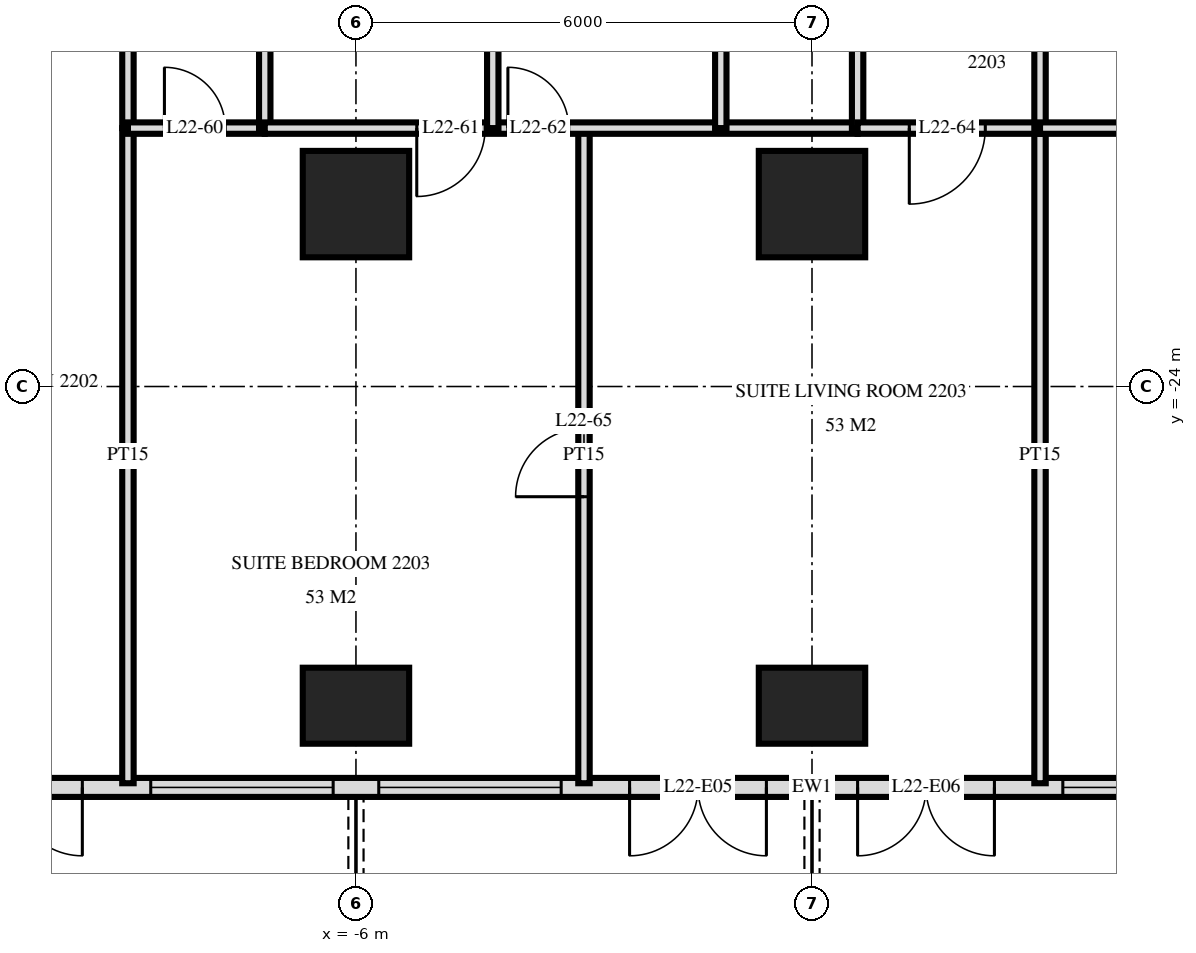
"""IFC4 building model, lengths in metres.
Left out: names, types, materials, properties, quantities, classifications, styles, units other than length and angle.
Written with IfcOpenShell. Run it as: python <this file> out.ifc"""

import sys

from ifc_helpers import new_model, si_unit, direction, frame, frame_2d, origin, origin_2d, place, context, subcontext, project, spatial, rectangle, extrude, element, fill, save


model = new_model("IFC4")
c1 = context("Model", 3, precision=1e-05, world=origin(), true_north=direction((0.0, 1.0)))
c2 = subcontext(c1, "Body", "Model", "MODEL_VIEW")
j1 = project(units=[si_unit("LENGTHUNIT", "METRE"), si_unit("PLANEANGLEUNIT", "RADIAN")], contexts=[c1])
p1 = place(None, origin())
s1 = spatial("IfcSite", under=j1, at=p1, CompositionType="ELEMENT")
p2 = place(p1, origin())
s2 = spatial("IfcBuilding", under=s1, at=p2, CompositionType="ELEMENT")
p3 = place(p2, frame((0.0, 0.0, 88.8)))
s3 = spatial("IfcBuildingStorey", under=s2, at=p3, CompositionType="ELEMENT", Elevation=88.8)
p4 = place(p3, frame((-6.0, -28.2, 0.0), z_axis=(0.0, 0.0, 1.0), x_axis=(1.0, 0.0, 0.0)))
e1 = element("IfcColumn", 1, at=p4, inside=s3, PredefinedType="COLUMN", context=c2, shape_type="SweptSolid", body=[
    extrude(rectangle(XDim=1.4, YDim=1.0, at=origin_2d()), origin(), (0.0, 0.0, 1.0), 3.6),
])
p5 = place(p3, frame((-6.0, -21.6, 0.0), z_axis=(0.0, 0.0, 1.0), x_axis=(1.0, 0.0, 0.0)))
e2 = element("IfcColumn", 2, at=p5, inside=s3, PredefinedType="COLUMN", context=c2, shape_type="SweptSolid", body=[
    extrude(rectangle(XDim=1.4, YDim=1.4, at=origin_2d()), origin(), (0.0, 0.0, 1.0), 3.6),
])
p6 = place(p3, frame((0.0, -28.2, 0.0), z_axis=(0.0, 0.0, 1.0), x_axis=(1.0, 0.0, 0.0)))
e3 = element("IfcColumn", 3, at=p6, inside=s3, PredefinedType="COLUMN", context=c2, shape_type="SweptSolid", body=[
    extrude(rectangle(XDim=1.4, YDim=1.0, at=origin_2d()), origin(), (0.0, 0.0, 1.0), 3.6),
])
p7 = place(p3, frame((0.0, -21.6, 0.0), z_axis=(0.0, 0.0, 1.0), x_axis=(1.0, 0.0, 0.0)))
e4 = element("IfcColumn", 4, at=p7, inside=s3, PredefinedType="COLUMN", context=c2, shape_type="SweptSolid", body=[
    extrude(rectangle(XDim=1.4, YDim=1.4, at=origin_2d()), origin(), (0.0, 0.0, 1.0), 3.6),
])
p8 = place(p3, frame((-28.775, -29.275, 0.0), z_axis=(0.0, 0.0, 1.0), x_axis=(1.0, 0.0, 0.0)))
e5 = element("IfcWall", 5, at=p8, inside=s3, PredefinedType="SOLIDWALL", context=c2, shape_type="SweptSolid", body=[
    extrude(rectangle(XDim=57.551, YDim=0.25, at=frame_2d((28.775, 0.0))), origin(), (0.0, 0.0, 1.0), 3.32),
])
p9 = place(p8, frame((0.575, 0.0, 0.0)))
e6 = element("IfcOpeningElement", 6, at=p9, cuts=e5, PredefinedType="OPENING", context=c2, shape_type="SweptSolid", body=[
    extrude(rectangle(XDim=1.8, YDim=2.4, at=frame_2d((0.9, 1.2))), frame((0.0, 0.135, 0.0), z_axis=(0.0, -1.0, 0.0), x_axis=(1.0, 0.0, 0.0)), (0.0, 0.0, 1.0), 0.27),
])
p10 = place(p8, frame((5.075, 0.0, 0.3)))
e7 = element("IfcOpeningElement", 7, at=p10, cuts=e5, PredefinedType="OPENING", context=c2, shape_type="SweptSolid", body=[
    extrude(rectangle(XDim=2.4, YDim=2.1, at=frame_2d((1.2, 1.05))), frame((0.0, 0.135, 0.0), z_axis=(0.0, -1.0, 0.0), x_axis=(1.0, 0.0, 0.0)), (0.0, 0.0, 1.0), 0.27),
])
p11 = place(p8, frame((8.375, 0.0, 0.0)))
e8 = element("IfcOpeningElement", 8, at=p11, cuts=e5, PredefinedType="OPENING", context=c2, shape_type="SweptSolid", body=[
    extrude(rectangle(XDim=1.8, YDim=2.4, at=frame_2d((0.9, 1.2))), frame((0.0, 0.135, 0.0), z_axis=(0.0, -1.0, 0.0), x_axis=(1.0, 0.0, 0.0)), (0.0, 0.0, 1.0), 0.27),
])
p12 = place(p8, frame((11.375, 0.0, 0.0)))
e9 = element("IfcOpeningElement", 9, at=p12, cuts=e5, PredefinedType="OPENING", context=c2, shape_type="SweptSolid", body=[
    extrude(rectangle(XDim=1.8, YDim=2.4, at=frame_2d((0.9, 1.2))), frame((0.0, 0.135, 0.0), z_axis=(0.0, -1.0, 0.0), x_axis=(1.0, 0.0, 0.0)), (0.0, 0.0, 1.0), 0.27),
])
p13 = place(p8, frame((14.075, 0.0, 0.3)))
e10 = element("IfcOpeningElement", 10, at=p13, cuts=e5, PredefinedType="OPENING", context=c2, shape_type="SweptSolid", body=[
    extrude(rectangle(XDim=2.4, YDim=2.1, at=frame_2d((1.2, 1.05))), frame((0.0, 0.135, 0.0), z_axis=(0.0, -1.0, 0.0), x_axis=(1.0, 0.0, 0.0)), (0.0, 0.0, 1.0), 0.27),
])
p14 = place(p8, frame((17.375, 0.0, 0.0)))
e11 = element("IfcOpeningElement", 11, at=p14, cuts=e5, PredefinedType="OPENING", context=c2, shape_type="SweptSolid", body=[
    extrude(rectangle(XDim=1.8, YDim=2.4, at=frame_2d((0.9, 1.2))), frame((0.0, 0.135, 0.0), z_axis=(0.0, -1.0, 0.0), x_axis=(1.0, 0.0, 0.0)), (0.0, 0.0, 1.0), 0.27),
])
p15 = place(p8, frame((20.075, 0.0, 0.3)))
e12 = element("IfcOpeningElement", 12, at=p15, cuts=e5, PredefinedType="OPENING", context=c2, shape_type="SweptSolid", body=[
    extrude(rectangle(XDim=2.4, YDim=2.1, at=frame_2d((1.2, 1.05))), frame((0.0, 0.135, 0.0), z_axis=(0.0, -1.0, 0.0), x_axis=(1.0, 0.0, 0.0)), (0.0, 0.0, 1.0), 0.27),
])
p16 = place(p8, frame((23.075, 0.0, 0.3)))
e13 = element("IfcOpeningElement", 13, at=p16, cuts=e5, PredefinedType="OPENING", context=c2, shape_type="SweptSolid", body=[
    extrude(rectangle(XDim=2.4, YDim=2.1, at=frame_2d((1.2, 1.05))), frame((0.0, 0.135, 0.0), z_axis=(0.0, -1.0, 0.0), x_axis=(1.0, 0.0, 0.0)), (0.0, 0.0, 1.0), 0.27),
])
p17 = place(p8, frame((26.375, 0.0, 0.0)))
e14 = element("IfcOpeningElement", 14, at=p17, cuts=e5, PredefinedType="OPENING", context=c2, shape_type="SweptSolid", body=[
    extrude(rectangle(XDim=1.8, YDim=2.4, at=frame_2d((0.9, 1.2))), frame((0.0, 0.135, 0.0), z_axis=(0.0, -1.0, 0.0), x_axis=(1.0, 0.0, 0.0)), (0.0, 0.0, 1.0), 0.27),
])
p18 = place(p8, frame((29.375, 0.0, 0.0)))
e15 = element("IfcOpeningElement", 15, at=p18, cuts=e5, PredefinedType="OPENING", context=c2, shape_type="SweptSolid", body=[
    extrude(rectangle(XDim=1.8, YDim=2.4, at=frame_2d((0.9, 1.2))), frame((0.0, 0.135, 0.0), z_axis=(0.0, -1.0, 0.0), x_axis=(1.0, 0.0, 0.0)), (0.0, 0.0, 1.0), 0.27),
])
p19 = place(p8, frame((32.075, 0.0, 0.3)))
e16 = element("IfcOpeningElement", 16, at=p19, cuts=e5, PredefinedType="OPENING", context=c2, shape_type="SweptSolid", body=[
    extrude(rectangle(XDim=2.4, YDim=2.1, at=frame_2d((1.2, 1.05))), frame((0.0, 0.135, 0.0), z_axis=(0.0, -1.0, 0.0), x_axis=(1.0, 0.0, 0.0)), (0.0, 0.0, 1.0), 0.27),
])
p20 = place(p8, frame((35.375, 0.0, 0.0)))
e17 = element("IfcOpeningElement", 17, at=p20, cuts=e5, PredefinedType="OPENING", context=c2, shape_type="SweptSolid", body=[
    extrude(rectangle(XDim=1.8, YDim=2.4, at=frame_2d((0.9, 1.2))), frame((0.0, 0.135, 0.0), z_axis=(0.0, -1.0, 0.0), x_axis=(1.0, 0.0, 0.0)), (0.0, 0.0, 1.0), 0.27),
])
p21 = place(p8, frame((38.075, 0.0, 0.3)))
e18 = element("IfcOpeningElement", 18, at=p21, cuts=e5, PredefinedType="OPENING", context=c2, shape_type="SweptSolid", body=[
    extrude(rectangle(XDim=2.4, YDim=2.1, at=frame_2d((1.2, 1.05))), frame((0.0, 0.135, 0.0), z_axis=(0.0, -1.0, 0.0), x_axis=(1.0, 0.0, 0.0)), (0.0, 0.0, 1.0), 0.27),
])
p22 = place(p8, frame((41.075, 0.0, 0.3)))
e19 = element("IfcOpeningElement", 19, at=p22, cuts=e5, PredefinedType="OPENING", context=c2, shape_type="SweptSolid", body=[
    extrude(rectangle(XDim=2.4, YDim=2.1, at=frame_2d((1.2, 1.05))), frame((0.0, 0.135, 0.0), z_axis=(0.0, -1.0, 0.0), x_axis=(1.0, 0.0, 0.0)), (0.0, 0.0, 1.0), 0.27),
])
p23 = place(p8, frame((44.375, 0.0, 0.0)))
e20 = element("IfcOpeningElement", 20, at=p23, cuts=e5, PredefinedType="OPENING", context=c2, shape_type="SweptSolid", body=[
    extrude(rectangle(XDim=1.8, YDim=2.4, at=frame_2d((0.9, 1.2))), frame((0.0, 0.135, 0.0), z_axis=(0.0, -1.0, 0.0), x_axis=(1.0, 0.0, 0.0)), (0.0, 0.0, 1.0), 0.27),
])
p24 = place(p8, frame((47.075, 0.0, 0.3)))
e21 = element("IfcOpeningElement", 21, at=p24, cuts=e5, PredefinedType="OPENING", context=c2, shape_type="SweptSolid", body=[
    extrude(rectangle(XDim=2.4, YDim=2.1, at=frame_2d((1.2, 1.05))), frame((0.0, 0.135, 0.0), z_axis=(0.0, -1.0, 0.0), x_axis=(1.0, 0.0, 0.0)), (0.0, 0.0, 1.0), 0.27),
])
p25 = place(p8, frame((50.375, 0.0, 0.0)))
e22 = element("IfcOpeningElement", 22, at=p25, cuts=e5, PredefinedType="OPENING", context=c2, shape_type="SweptSolid", body=[
    extrude(rectangle(XDim=1.8, YDim=2.4, at=frame_2d((0.9, 1.2))), frame((0.0, 0.135, 0.0), z_axis=(0.0, -1.0, 0.0), x_axis=(1.0, 0.0, 0.0)), (0.0, 0.0, 1.0), 0.27),
])
p26 = place(p8, frame((53.375, 0.0, 0.0)))
e23 = element("IfcOpeningElement", 23, at=p26, cuts=e5, PredefinedType="OPENING", context=c2, shape_type="SweptSolid", body=[
    extrude(rectangle(XDim=1.8, YDim=2.4, at=frame_2d((0.9, 1.2))), frame((0.0, 0.135, 0.0), z_axis=(0.0, -1.0, 0.0), x_axis=(1.0, 0.0, 0.0)), (0.0, 0.0, 1.0), 0.27),
])
p27 = place(p3, frame((3.0, -20.6, 0.0), z_axis=(0.0, 0.0, 1.0), x_axis=(0.0, 1.0, 0.0)))
e24 = element("IfcWall", 24, at=p27, inside=s3, PredefinedType="PARTITIONING", context=c2, shape_type="SweptSolid", body=[
    extrude(rectangle(XDim=3.6, YDim=0.15, at=frame_2d((1.8, 0.0))), origin(), (0.0, 0.0, 1.0), 3.32),
])
p28 = place(p3, frame((3.0, -29.22, 0.0), z_axis=(0.0, 0.0, 1.0), x_axis=(0.0, 1.0, 0.0)))
e25 = element("IfcWall", 25, at=p28, inside=s3, PredefinedType="PARTITIONING", context=c2, shape_type="SweptSolid", body=[
    extrude(rectangle(XDim=8.62, YDim=0.15, at=frame_2d((4.31, 0.0))), origin(), (0.0, 0.0, 1.0), 3.32),
])
p29 = place(p3, frame((0.6, -20.6, 0.0), z_axis=(0.0, 0.0, 1.0), x_axis=(0.0, 1.0, 0.0)))
e26 = element("IfcWall", 26, at=p29, inside=s3, PredefinedType="PARTITIONING", context=c2, shape_type="SweptSolid", body=[
    extrude(rectangle(XDim=3.6, YDim=0.15, at=frame_2d((1.8, 0.0))), origin(), (0.0, 0.0, 1.0), 3.32),
])
p30 = place(p29, frame((1.28, 0.0, 0.0)))
e27 = element("IfcOpeningElement", 27, at=p30, cuts=e26, PredefinedType="OPENING", context=c2, shape_type="SweptSolid", body=[
    extrude(rectangle(XDim=1.0, YDim=2.1, at=frame_2d((0.5, 1.05))), frame((0.0, 0.085, 0.0), z_axis=(0.0, -1.0, 0.0), x_axis=(1.0, 0.0, 0.0)), (0.0, 0.0, 1.0), 0.17),
])
p31 = place(p3, frame((-1.2, -20.6, 0.0), z_axis=(0.0, 0.0, 1.0), x_axis=(0.0, 1.0, 0.0)))
e28 = element("IfcWall", 28, at=p31, inside=s3, PredefinedType="PARTITIONING", context=c2, shape_type="SweptSolid", body=[
    extrude(rectangle(XDim=3.6, YDim=0.15, at=frame_2d((1.8, 0.0))), origin(), (0.0, 0.0, 1.0), 3.32),
])
p32 = place(p3, frame((-3.0, -29.22, 0.0), z_axis=(0.0, 0.0, 1.0), x_axis=(0.0, 1.0, 0.0)))
e29 = element("IfcWall", 29, at=p32, inside=s3, PredefinedType="PARTITIONING", context=c2, shape_type="SweptSolid", body=[
    extrude(rectangle(XDim=8.62, YDim=0.15, at=frame_2d((4.31, 0.0))), origin(), (0.0, 0.0, 1.0), 3.32),
])
p33 = place(p32, frame((3.77, 0.0, 0.0)))
e30 = element("IfcOpeningElement", 30, at=p33, cuts=e29, PredefinedType="OPENING", context=c2, shape_type="SweptSolid", body=[
    extrude(rectangle(XDim=0.9, YDim=2.1, at=frame_2d((0.45, 1.05))), frame((0.0, 0.085, 0.0), z_axis=(0.0, -1.0, 0.0), x_axis=(1.0, 0.0, 0.0)), (0.0, 0.0, 1.0), 0.17),
])
p34 = place(p3, frame((-4.2, -20.6, 0.0), z_axis=(0.0, 0.0, 1.0), x_axis=(0.0, 1.0, 0.0)))
e31 = element("IfcWall", 31, at=p34, inside=s3, PredefinedType="PARTITIONING", context=c2, shape_type="SweptSolid", body=[
    extrude(rectangle(XDim=3.6, YDim=0.15, at=frame_2d((1.8, 0.0))), origin(), (0.0, 0.0, 1.0), 3.32),
])
p35 = place(p3, frame((-7.2, -20.6, 0.0), z_axis=(0.0, 0.0, 1.0), x_axis=(0.0, 1.0, 0.0)))
e32 = element("IfcWall", 32, at=p35, inside=s3, PredefinedType="PLUMBINGWALL", context=c2, shape_type="SweptSolid", body=[
    extrude(rectangle(XDim=3.6, YDim=0.15, at=frame_2d((1.8, 0.0))), origin(), (0.0, 0.0, 1.0), 3.32),
])
p36 = place(p3, frame((-9.0, -29.22, 0.0), z_axis=(0.0, 0.0, 1.0), x_axis=(0.0, 1.0, 0.0)))
e33 = element("IfcWall", 33, at=p36, inside=s3, PredefinedType="PARTITIONING", context=c2, shape_type="SweptSolid", body=[
    extrude(rectangle(XDim=8.62, YDim=0.15, at=frame_2d((4.31, 0.0))), origin(), (0.0, 0.0, 1.0), 3.32),
])
p37 = place(p3, frame((-9.0, -20.6, 0.0), z_axis=(0.0, 0.0, 1.0), x_axis=(0.0, 1.0, 0.0)))
e34 = element("IfcWall", 34, at=p37, inside=s3, PredefinedType="PLUMBINGWALL", context=c2, shape_type="SweptSolid", body=[
    extrude(rectangle(XDim=3.6, YDim=0.15, at=frame_2d((1.8, 0.0))), origin(), (0.0, 0.0, 1.0), 3.32),
])
p38 = place(p3, frame((0.6, -20.6, 0.0), z_axis=(0.0, 0.0, 1.0), x_axis=(1.0, 0.0, 0.0)))
e35 = element("IfcWall", 35, at=p38, inside=s3, PredefinedType="PARTITIONING", context=c2, shape_type="SweptSolid", body=[
    extrude(rectangle(XDim=2.4, YDim=0.15, at=frame_2d((1.2, 0.0))), origin(), (0.0, 0.0, 1.0), 3.32),
])
p39 = place(p38, frame((0.68, 0.0, 0.0)))
e36 = element("IfcOpeningElement", 36, at=p39, cuts=e35, PredefinedType="OPENING", context=c2, shape_type="SweptSolid", body=[
    extrude(rectangle(XDim=1.0, YDim=2.1, at=frame_2d((0.5, 1.05))), frame((0.0, 0.085, 0.0), z_axis=(0.0, -1.0, 0.0), x_axis=(1.0, 0.0, 0.0)), (0.0, 0.0, 1.0), 0.17),
])
p40 = place(p3, frame((-7.2, -20.6, 0.0), z_axis=(0.0, 0.0, 1.0), x_axis=(1.0, 0.0, 0.0)))
e37 = element("IfcWall", 37, at=p40, inside=s3, PredefinedType="PARTITIONING", context=c2, shape_type="SweptSolid", body=[
    extrude(rectangle(XDim=7.8, YDim=0.15, at=frame_2d((3.9, 0.0))), origin(), (0.0, 0.0, 1.0), 3.32),
])
p41 = place(p40, frame((2.0, 0.0, 0.0)))
e38 = element("IfcOpeningElement", 38, at=p41, cuts=e37, PredefinedType="OPENING", context=c2, shape_type="SweptSolid", body=[
    extrude(rectangle(XDim=0.9, YDim=2.1, at=frame_2d((0.45, 1.05))), frame((0.0, 0.085, 0.0), z_axis=(0.0, -1.0, 0.0), x_axis=(1.0, 0.0, 0.0)), (0.0, 0.0, 1.0), 0.17),
])
p42 = place(p40, frame((3.199, 0.0, 0.0)))
e39 = element("IfcOpeningElement", 39, at=p42, cuts=e37, PredefinedType="OPENING", context=c2, shape_type="SweptSolid", body=[
    extrude(rectangle(XDim=0.8, YDim=2.1, at=frame_2d((0.4, 1.05))), frame((0.0, 0.085, 0.0), z_axis=(0.0, -1.0, 0.0), x_axis=(1.0, 0.0, 0.0)), (0.0, 0.0, 1.0), 0.17),
])
p43 = place(p3, frame((3.0, -20.6, 0.0), z_axis=(0.0, 0.0, 1.0), x_axis=(1.0, 0.0, 0.0)))
e40 = element("IfcWall", 40, at=p43, inside=s3, PredefinedType="PARTITIONING", context=c2, shape_type="SweptSolid", body=[
    extrude(rectangle(XDim=2.7, YDim=0.15, at=frame_2d((1.35, 0.0))), origin(), (0.0, 0.0, 1.0), 3.32),
])
p44 = place(p3, frame((-9.0, -20.6, 0.0), z_axis=(0.0, 0.0, 1.0), x_axis=(1.0, 0.0, 0.0)))
e41 = element("IfcWall", 41, at=p44, inside=s3, PredefinedType="PLUMBINGWALL", context=c2, shape_type="SweptSolid", body=[
    extrude(rectangle(XDim=1.8, YDim=0.15, at=frame_2d((0.9, 0.0))), origin(), (0.0, 0.0, 1.0), 3.32),
])
p45 = place(p44, frame((0.48, 0.0, 0.0)))
e42 = element("IfcOpeningElement", 42, at=p45, cuts=e41, PredefinedType="OPENING", context=c2, shape_type="SweptSolid", body=[
    extrude(rectangle(XDim=0.8, YDim=2.1, at=frame_2d((0.4, 1.05))), frame((0.0, 0.085, 0.0), z_axis=(0.0, -1.0, 0.0), x_axis=(1.0, 0.0, 0.0)), (0.0, 0.0, 1.0), 0.17),
])
p46 = place(p14, frame((0.9, 0.0, 0.0), z_axis=(0.0, 0.0, 1.0), x_axis=(-1.0, 0.0, 0.0)))
e43 = element("IfcDoor", 43, at=p46, inside=s3, OperationType="DOUBLE_DOOR_SINGLE_SWING", PredefinedType="DOOR", context=c2, shape_type="SweptSolid", body=[
    extrude(rectangle(XDim=1.8, YDim=2.4, at=frame_2d((0.0, 1.2))), frame((0.0, -0.025, 0.0), z_axis=(0.0, 1.0, 0.0), x_axis=(-1.0, 0.0, 0.0)), (0.0, 0.0, 1.0), 0.05),
])
fill(e11, e43)
p47 = place(p15, origin())
e44 = element("IfcWindow", 44, at=p47, inside=s3, PartitioningType="SINGLE_PANEL", PredefinedType="WINDOW", context=c2, shape_type="SweptSolid", body=[
    extrude(rectangle(XDim=2.4, YDim=2.1, at=frame_2d((1.2, 1.05))), frame((0.0, 0.03, 0.0), z_axis=(0.0, -1.0, 0.0), x_axis=(1.0, 0.0, 0.0)), (0.0, 0.0, 1.0), 0.06),
])
fill(e12, e44)
p48 = place(p16, origin())
e45 = element("IfcWindow", 45, at=p48, inside=s3, PartitioningType="SINGLE_PANEL", PredefinedType="WINDOW", context=c2, shape_type="SweptSolid", body=[
    extrude(rectangle(XDim=2.4, YDim=2.1, at=frame_2d((1.2, 1.05))), frame((0.0, 0.03, 0.0), z_axis=(0.0, -1.0, 0.0), x_axis=(1.0, 0.0, 0.0)), (0.0, 0.0, 1.0), 0.06),
])
fill(e13, e45)
p49 = place(p17, frame((0.9, 0.0, 0.0), z_axis=(0.0, 0.0, 1.0), x_axis=(-1.0, 0.0, 0.0)))
e46 = element("IfcDoor", 46, at=p49, inside=s3, OperationType="DOUBLE_DOOR_SINGLE_SWING", PredefinedType="DOOR", context=c2, shape_type="SweptSolid", body=[
    extrude(rectangle(XDim=1.8, YDim=2.4, at=frame_2d((0.0, 1.2))), frame((0.0, -0.025, 0.0), z_axis=(0.0, 1.0, 0.0), x_axis=(-1.0, 0.0, 0.0)), (0.0, 0.0, 1.0), 0.05),
])
fill(e14, e46)
p50 = place(p18, frame((0.9, 0.0, 0.0), z_axis=(0.0, 0.0, 1.0), x_axis=(-1.0, 0.0, 0.0)))
e47 = element("IfcDoor", 47, at=p50, inside=s3, OperationType="DOUBLE_DOOR_SINGLE_SWING", PredefinedType="DOOR", context=c2, shape_type="SweptSolid", body=[
    extrude(rectangle(XDim=1.8, YDim=2.4, at=frame_2d((0.0, 1.2))), frame((0.0, -0.025, 0.0), z_axis=(0.0, 1.0, 0.0), x_axis=(-1.0, 0.0, 0.0)), (0.0, 0.0, 1.0), 0.05),
])
fill(e15, e47)
p51 = place(p19, origin())
e48 = element("IfcWindow", 48, at=p51, inside=s3, PartitioningType="SINGLE_PANEL", PredefinedType="WINDOW", context=c2, shape_type="SweptSolid", body=[
    extrude(rectangle(XDim=2.4, YDim=2.1, at=frame_2d((1.2, 1.05))), frame((0.0, 0.03, 0.0), z_axis=(0.0, -1.0, 0.0), x_axis=(1.0, 0.0, 0.0)), (0.0, 0.0, 1.0), 0.06),
])
fill(e16, e48)
p52 = place(p45, origin())
e49 = element("IfcDoor", 49, at=p52, inside=s3, OperationType="SINGLE_SWING_RIGHT", PredefinedType="DOOR", context=c2, shape_type="SweptSolid", body=[
    extrude(rectangle(XDim=0.8, YDim=2.1, at=frame_2d((0.4, 1.05))), frame((0.0, 0.025, 0.0), z_axis=(0.0, -1.0, 0.0), x_axis=(1.0, 0.0, 0.0)), (0.0, 0.0, 1.0), 0.05),
])
fill(e42, e49)
p53 = place(p41, frame((0.45, 0.0, 0.0), z_axis=(0.0, 0.0, 1.0), x_axis=(-1.0, 0.0, 0.0)))
e50 = element("IfcDoor", 50, at=p53, inside=s3, OperationType="SINGLE_SWING_LEFT", PredefinedType="DOOR", context=c2, shape_type="SweptSolid", body=[
    extrude(rectangle(XDim=0.9, YDim=2.1, at=frame_2d((0.0, 1.05))), frame((0.0, -0.025, 0.0), z_axis=(0.0, 1.0, 0.0), x_axis=(-1.0, 0.0, 0.0)), (0.0, 0.0, 1.0), 0.05),
])
fill(e38, e50)
p54 = place(p42, origin())
e51 = element("IfcDoor", 51, at=p54, inside=s3, OperationType="SINGLE_SWING_RIGHT", PredefinedType="DOOR", context=c2, shape_type="SweptSolid", body=[
    extrude(rectangle(XDim=0.8, YDim=2.1, at=frame_2d((0.4, 1.05))), frame((0.0, 0.025, 0.0), z_axis=(0.0, -1.0, 0.0), x_axis=(1.0, 0.0, 0.0)), (0.0, 0.0, 1.0), 0.05),
])
fill(e39, e51)
p55 = place(p39, frame((0.5, 0.0, 0.0), z_axis=(0.0, 0.0, 1.0), x_axis=(-1.0, 0.0, 0.0)))
e52 = element("IfcDoor", 52, at=p55, inside=s3, OperationType="SINGLE_SWING_LEFT", PredefinedType="DOOR", context=c2, shape_type="SweptSolid", body=[
    extrude(rectangle(XDim=1.0, YDim=2.1, at=frame_2d((0.0, 1.05))), frame((0.0, -0.025, 0.0), z_axis=(0.0, 1.0, 0.0), x_axis=(-1.0, 0.0, 0.0)), (0.0, 0.0, 1.0), 0.05),
])
fill(e36, e52)
p56 = place(p33, origin())
e53 = element("IfcDoor", 53, at=p56, inside=s3, OperationType="SINGLE_SWING_RIGHT", PredefinedType="DOOR", context=c2, shape_type="SweptSolid", body=[
    extrude(rectangle(XDim=0.9, YDim=2.1, at=frame_2d((0.45, 1.05))), frame((0.0, 0.025, 0.0), z_axis=(0.0, -1.0, 0.0), x_axis=(1.0, 0.0, 0.0)), (0.0, 0.0, 1.0), 0.05),
])
fill(e30, e53)
save(model, sys.argv[1])
